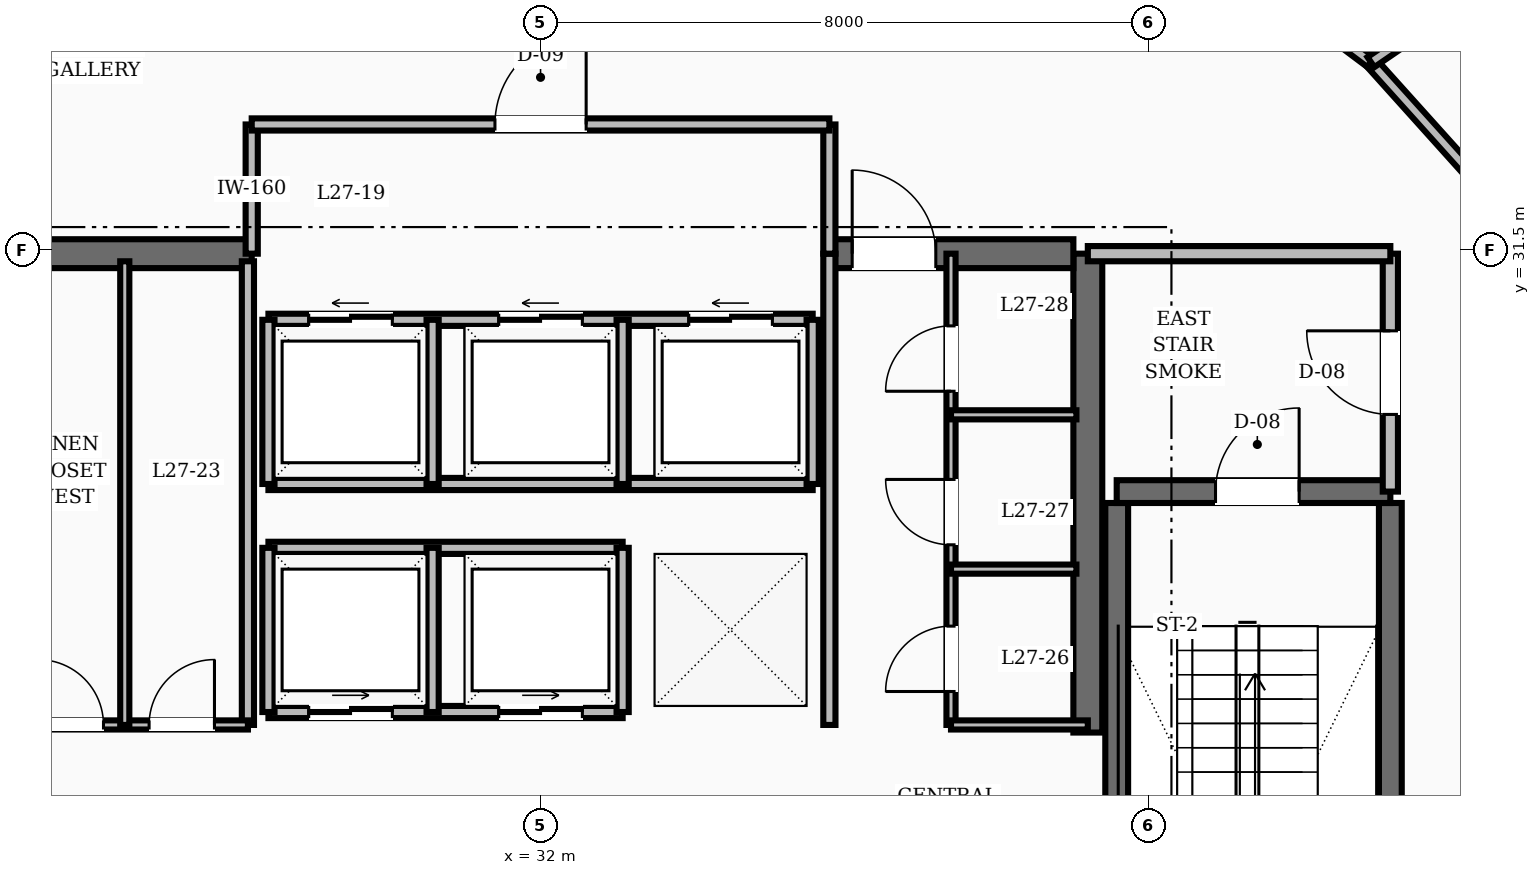
"""IFC4 building model, lengths in metres.
Left out: names, types, materials, properties, quantities, classifications, styles, units other than length and angle.
Written with IfcOpenShell. Run it as: python <this file> out.ifc"""

import sys

from ifc_helpers import new_model, si_unit, direction, frame, frame_2d, origin, place, context, subcontext, project, spatial, rectangle, extrude, element, fill, save


model = new_model("IFC4")
c1 = context("Model", 3, precision=1e-05, world=origin(), true_north=direction((0.0, 1.0)))
c2 = subcontext(c1, "Body", "Model", "MODEL_VIEW")
j1 = project(units=[si_unit("LENGTHUNIT", "METRE"), si_unit("PLANEANGLEUNIT", "RADIAN")], contexts=[c1])
p1 = place(None, origin())
s1 = spatial("IfcSite", under=j1, at=p1, CompositionType="ELEMENT")
p2 = place(p1, origin())
s2 = spatial("IfcBuilding", under=s1, at=p2, CompositionType="ELEMENT")
p3 = place(p2, frame((0.0, 0.0, 106.0)))
s3 = spatial("IfcBuildingStorey", under=s2, at=p3, CompositionType="ELEMENT", Elevation=106.0)
p4 = place(p3, frame((39.2, 25.15, 0.0), z_axis=(0.0, 0.0, 1.0), x_axis=(0.0, 1.0, 0.0)))
e1 = element("IfcWall", 1, at=p4, inside=s3, PredefinedType="SHEAR", context=c2, shape_type="SweptSolid", body=[
    extrude(rectangle(XDim=6.3, YDim=0.38, at=frame_2d((3.15, 0.0))), origin(), (0.0, 0.0, 1.0), 4.8),
])
p5 = place(p3, frame((24.99, 31.45, 0.0), z_axis=(0.0, 0.0, 1.0), x_axis=(1.0, 0.0, 0.0)))
e2 = element("IfcWall", 2, at=p5, inside=s3, PredefinedType="SHEAR", context=c2, shape_type="SweptSolid", body=[
    extrude(rectangle(XDim=3.21, YDim=0.38, at=frame_2d((1.605, 0.0))), origin(), (0.0, 0.0, 1.0), 4.8),
])
p6 = place(p3, frame((35.8, 31.45, 0.0), z_axis=(0.0, 0.0, 1.0), x_axis=(1.0, 0.0, 0.0)))
e3 = element("IfcWall", 3, at=p6, inside=s3, PredefinedType="SHEAR", context=c2, shape_type="SweptSolid", body=[
    extrude(rectangle(XDim=3.21, YDim=0.38, at=frame_2d((1.605, 0.0))), origin(), (0.0, 0.0, 1.0), 4.8),
])
p7 = place(p6, frame((0.3, 0.0, 0.0)))
e4 = element("IfcOpeningElement", 4, at=p7, cuts=e3, PredefinedType="OPENING", context=c2, shape_type="SweptSolid", body=[
    extrude(rectangle(XDim=1.1, YDim=2.1, at=frame_2d((0.55, 1.05))), frame((0.0, 0.2, 0.0), z_axis=(0.0, -1.0, 0.0), x_axis=(1.0, 0.0, 0.0)), (0.0, 0.0, 1.0), 0.4),
])
for number, where, z_axis, x_axis in (
    (5, (43.18, 19.43, 0.0), (0.0, 0.0, 1.0), (0.0, 1.0, 0.0)),
    (6, (39.58, 19.43, 0.0), (0.0, 0.0, 1.0), (0.0, 1.0, 0.0)),
):
    element("IfcWall", number, at=place(p3, frame(where, z_axis=z_axis, x_axis=x_axis)), inside=s3, PredefinedType="SHEAR", context=c2, shape_type="SweptSolid", body=[
        extrude(rectangle(XDim=8.74, YDim=0.3, at=frame_2d((4.37, 0.0))), origin(), (0.0, 0.0, 1.0), 4.8),
    ])
p8 = place(p3, frame((39.58, 28.32, 0.0), z_axis=(0.0, 0.0, 1.0), x_axis=(1.0, 0.0, 0.0)))
e7 = element("IfcWall", 7, at=p8, inside=s3, PredefinedType="SHEAR", context=c2, shape_type="SweptSolid", body=[
    extrude(rectangle(XDim=3.6, YDim=0.3, at=frame_2d((1.8, 0.0))), origin(), (0.0, 0.0, 1.0), 4.8),
])
p9 = place(p8, frame((1.3, 0.0, 0.0)))
e8 = element("IfcOpeningElement", 8, at=p9, cuts=e7, PredefinedType="OPENING", context=c2, shape_type="SweptSolid", body=[
    extrude(rectangle(XDim=1.1, YDim=2.1, at=frame_2d((0.55, 1.05))), frame((0.0, 0.16, 0.0), z_axis=(0.0, -1.0, 0.0), x_axis=(1.0, 0.0, 0.0)), (0.0, 0.0, 1.0), 0.32),
])
p10 = place(p3, frame((43.18, 28.32, 0.0), z_axis=(0.0, 0.0, 1.0), x_axis=(0.0, 1.0, 0.0)))
e9 = element("IfcWall", 9, at=p10, inside=s3, PredefinedType="SOLIDWALL", context=c2, shape_type="SweptSolid", body=[
    extrude(rectangle(XDim=3.13, YDim=0.2, at=frame_2d((1.565, 0.0))), origin(), (0.0, 0.0, 1.0), 3.71),
])
p11 = place(p10, frame((1.015, 0.0, 0.0)))
e10 = element("IfcOpeningElement", 10, at=p11, cuts=e9, PredefinedType="OPENING", context=c2, shape_type="SweptSolid", body=[
    extrude(rectangle(XDim=1.1, YDim=2.1, at=frame_2d((0.55, 1.05))), frame((0.0, 0.11, 0.0), z_axis=(0.0, -1.0, 0.0), x_axis=(1.0, 0.0, 0.0)), (0.0, 0.0, 1.0), 0.22),
])
p12 = place(p3, frame((39.2, 31.45, 0.0), z_axis=(0.0, 0.0, 1.0), x_axis=(1.0, 0.0, 0.0)))
e11 = element("IfcWall", 11, at=p12, inside=s3, PredefinedType="SOLIDWALL", context=c2, shape_type="SweptSolid", body=[
    extrude(rectangle(XDim=3.98, YDim=0.2, at=frame_2d((1.99, 0.0))), origin(), (0.0, 0.0, 1.0), 3.71),
])
p13 = place(p3, frame((35.8, 25.25, 0.0), z_axis=(0.0, 0.0, 1.0), x_axis=(0.0, 1.0, 0.0)))
e12 = element("IfcWall", 12, at=p13, inside=s3, PredefinedType="SOLIDWALL", context=c2, shape_type="SweptSolid", body=[
    extrude(rectangle(XDim=6.2, YDim=0.16, at=frame_2d((3.1, 0.0))), origin(), (0.0, 0.0, 1.0), 3.71),
])
p14 = place(p3, frame((28.42, 30.58, 0.0), z_axis=(0.0, 0.0, 1.0), x_axis=(1.0, 0.0, 0.0)))
e13 = element("IfcWall", 13, at=p14, inside=s3, PredefinedType="SOLIDWALL", context=c2, shape_type="SweptSolid", body=[
    extrude(rectangle(XDim=7.16, YDim=0.16, at=frame_2d((3.58, 0.0))), origin(), (0.0, 0.0, 1.0), 3.71),
])
p15 = place(p14, frame((0.53, 0.0, 0.0)))
e14 = element("IfcOpeningElement", 14, at=p15, cuts=e13, PredefinedType="OPENING", context=c2, shape_type="SweptSolid", body=[
    extrude(rectangle(XDim=1.1, YDim=2.15, at=frame_2d((0.55, 1.075))), frame((0.0, 0.09, 0.0), z_axis=(0.0, -1.0, 0.0), x_axis=(1.0, 0.0, 0.0)), (0.0, 0.0, 1.0), 0.18),
])
p16 = place(p14, frame((3.03, 0.0, 0.0)))
e15 = element("IfcOpeningElement", 15, at=p16, cuts=e13, PredefinedType="OPENING", context=c2, shape_type="SweptSolid", body=[
    extrude(rectangle(XDim=1.1, YDim=2.15, at=frame_2d((0.55, 1.075))), frame((0.0, 0.09, 0.0), z_axis=(0.0, -1.0, 0.0), x_axis=(1.0, 0.0, 0.0)), (0.0, 0.0, 1.0), 0.18),
])
p17 = place(p14, frame((5.53, 0.0, 0.0)))
e16 = element("IfcOpeningElement", 16, at=p17, cuts=e13, PredefinedType="OPENING", context=c2, shape_type="SweptSolid", body=[
    extrude(rectangle(XDim=1.1, YDim=2.15, at=frame_2d((0.55, 1.075))), frame((0.0, 0.09, 0.0), z_axis=(0.0, -1.0, 0.0), x_axis=(1.0, 0.0, 0.0)), (0.0, 0.0, 1.0), 0.18),
])
p18 = place(p3, frame((28.42, 28.42, 0.0), z_axis=(0.0, 0.0, 1.0), x_axis=(1.0, 0.0, 0.0)))
e17 = element("IfcWall", 17, at=p18, inside=s3, PredefinedType="SOLIDWALL", context=c2, shape_type="SweptSolid", body=[
    extrude(rectangle(XDim=7.16, YDim=0.16, at=frame_2d((3.58, 0.0))), origin(), (0.0, 0.0, 1.0), 3.71),
])
for number, where, z_axis, x_axis in (
    (18, (28.42, 28.42, 0.0), (0.0, 0.0, 1.0), (0.0, 1.0, 0.0)),
    (19, (30.58, 28.42, 0.0), (0.0, 0.0, 1.0), (0.0, 1.0, 0.0)),
    (20, (33.08, 28.42, 0.0), (0.0, 0.0, 1.0), (0.0, 1.0, 0.0)),
    (21, (35.58, 28.42, 0.0), (0.0, 0.0, 1.0), (0.0, 1.0, 0.0)),
):
    element("IfcWall", number, at=place(p3, frame(where, z_axis=z_axis, x_axis=x_axis)), inside=s3, PredefinedType="SOLIDWALL", context=c2, shape_type="SweptSolid", body=[
        extrude(rectangle(XDim=2.16, YDim=0.16, at=frame_2d((1.08, 0.0))), origin(), (0.0, 0.0, 1.0), 3.71),
    ])
p19 = place(p3, frame((28.42, 25.42, 0.0), z_axis=(0.0, 0.0, 1.0), x_axis=(1.0, 0.0, 0.0)))
e22 = element("IfcWall", 22, at=p19, inside=s3, PredefinedType="SOLIDWALL", context=c2, shape_type="SweptSolid", body=[
    extrude(rectangle(XDim=4.66, YDim=0.16, at=frame_2d((2.33, 0.0))), origin(), (0.0, 0.0, 1.0), 3.71),
])
p20 = place(p19, frame((0.53, 0.0, 0.0)))
e23 = element("IfcOpeningElement", 23, at=p20, cuts=e22, PredefinedType="OPENING", context=c2, shape_type="SweptSolid", body=[
    extrude(rectangle(XDim=1.1, YDim=2.15, at=frame_2d((0.55, 1.075))), frame((0.0, 0.09, 0.0), z_axis=(0.0, -1.0, 0.0), x_axis=(1.0, 0.0, 0.0)), (0.0, 0.0, 1.0), 0.18),
])
p21 = place(p19, frame((3.03, 0.0, 0.0)))
e24 = element("IfcOpeningElement", 24, at=p21, cuts=e22, PredefinedType="OPENING", context=c2, shape_type="SweptSolid", body=[
    extrude(rectangle(XDim=1.1, YDim=2.15, at=frame_2d((0.55, 1.075))), frame((0.0, 0.09, 0.0), z_axis=(0.0, -1.0, 0.0), x_axis=(1.0, 0.0, 0.0)), (0.0, 0.0, 1.0), 0.18),
])
p22 = place(p3, frame((28.42, 27.58, 0.0), z_axis=(0.0, 0.0, 1.0), x_axis=(1.0, 0.0, 0.0)))
e25 = element("IfcWall", 25, at=p22, inside=s3, PredefinedType="SOLIDWALL", context=c2, shape_type="SweptSolid", body=[
    extrude(rectangle(XDim=4.66, YDim=0.16, at=frame_2d((2.33, 0.0))), origin(), (0.0, 0.0, 1.0), 3.71),
])
for number, where, z_axis, x_axis in (
    (26, (28.42, 25.42, 0.0), (0.0, 0.0, 1.0), (0.0, 1.0, 0.0)),
    (27, (30.58, 25.42, 0.0), (0.0, 0.0, 1.0), (0.0, 1.0, 0.0)),
    (28, (33.08, 25.42, 0.0), (0.0, 0.0, 1.0), (0.0, 1.0, 0.0)),
):
    element("IfcWall", number, at=place(p3, frame(where, z_axis=z_axis, x_axis=x_axis)), inside=s3, PredefinedType="SOLIDWALL", context=c2, shape_type="SweptSolid", body=[
        extrude(rectangle(XDim=2.16, YDim=0.16, at=frame_2d((1.08, 0.0))), origin(), (0.0, 0.0, 1.0), 3.71),
    ])
for number, where, z_axis, x_axis in (
    (29, (28.2, 31.45, 0.0), (0.0, 0.0, 1.0), (0.0, 1.0, 0.0)),
    (30, (35.8, 31.45, 0.0), (0.0, 0.0, 1.0), (0.0, 1.0, 0.0)),
):
    element("IfcWall", number, at=place(p3, frame(where, z_axis=z_axis, x_axis=x_axis)), inside=s3, PredefinedType="SOLIDWALL", context=c2, shape_type="SweptSolid", body=[
        extrude(rectangle(XDim=1.7, YDim=0.16, at=frame_2d((0.85, 0.0))), origin(), (0.0, 0.0, 1.0), 3.71),
    ])
p23 = place(p3, frame((28.2, 33.15, 0.0), z_axis=(0.0, 0.0, 1.0), x_axis=(1.0, 0.0, 0.0)))
e31 = element("IfcWall", 31, at=p23, inside=s3, PredefinedType="SOLIDWALL", context=c2, shape_type="SweptSolid", body=[
    extrude(rectangle(XDim=7.6, YDim=0.16, at=frame_2d((3.8, 0.0))), origin(), (0.0, 0.0, 1.0), 3.71),
])
p24 = place(p23, frame((3.2, 0.0, 0.0)))
e32 = element("IfcOpeningElement", 32, at=p24, cuts=e31, PredefinedType="OPENING", context=c2, shape_type="SweptSolid", body=[
    extrude(rectangle(XDim=1.2, YDim=2.1, at=frame_2d((0.6, 1.05))), frame((0.0, 0.09, 0.0), z_axis=(0.0, -1.0, 0.0), x_axis=(1.0, 0.0, 0.0)), (0.0, 0.0, 1.0), 0.18),
])
p25 = place(p3, frame((28.15, 25.25, 0.0), z_axis=(0.0, 0.0, 1.0), x_axis=(0.0, 1.0, 0.0)))
e33 = element("IfcWall", 33, at=p25, inside=s3, PredefinedType="SOLIDWALL", context=c2, shape_type="SweptSolid", body=[
    extrude(rectangle(XDim=6.1, YDim=0.16, at=frame_2d((3.05, 0.0))), origin(), (0.0, 0.0, 1.0), 3.71),
])
p26 = place(p3, frame((24.95, 25.25, 0.0), z_axis=(0.0, 0.0, 1.0), x_axis=(1.0, 0.0, 0.0)))
e34 = element("IfcWall", 34, at=p26, inside=s3, PredefinedType="PARTITIONING", context=c2, shape_type="SweptSolid", body=[
    extrude(rectangle(XDim=3.2, YDim=0.12, at=frame_2d((1.6, 0.0))), origin(), (0.0, 0.0, 1.0), 3.71),
])
p27 = place(p26, frame((0.44, 0.0, 0.0)))
e35 = element("IfcOpeningElement", 35, at=p27, cuts=e34, PredefinedType="OPENING", context=c2, shape_type="SweptSolid", body=[
    extrude(rectangle(XDim=0.86, YDim=2.1, at=frame_2d((0.43, 1.05))), frame((0.0, 0.07, 0.0), z_axis=(0.0, -1.0, 0.0), x_axis=(1.0, 0.0, 0.0)), (0.0, 0.0, 1.0), 0.14),
])
p28 = place(p26, frame((1.9, 0.0, 0.0)))
e36 = element("IfcOpeningElement", 36, at=p28, cuts=e34, PredefinedType="OPENING", context=c2, shape_type="SweptSolid", body=[
    extrude(rectangle(XDim=0.86, YDim=2.1, at=frame_2d((0.43, 1.05))), frame((0.0, 0.07, 0.0), z_axis=(0.0, -1.0, 0.0), x_axis=(1.0, 0.0, 0.0)), (0.0, 0.0, 1.0), 0.14),
])
p29 = place(p3, frame((37.4, 25.25, 0.0), z_axis=(0.0, 0.0, 1.0), x_axis=(0.0, 1.0, 0.0)))
e37 = element("IfcWall", 37, at=p29, inside=s3, PredefinedType="PARTITIONING", context=c2, shape_type="SweptSolid", body=[
    extrude(rectangle(XDim=6.2, YDim=0.12, at=frame_2d((3.1, 0.0))), origin(), (0.0, 0.0, 1.0), 3.71),
])
p30 = place(p29, frame((0.44, 0.0, 0.0)))
e38 = element("IfcOpeningElement", 38, at=p30, cuts=e37, PredefinedType="OPENING", context=c2, shape_type="SweptSolid", body=[
    extrude(rectangle(XDim=0.86, YDim=2.1, at=frame_2d((0.43, 1.05))), frame((0.0, 0.07, 0.0), z_axis=(0.0, -1.0, 0.0), x_axis=(1.0, 0.0, 0.0)), (0.0, 0.0, 1.0), 0.14),
])
p31 = place(p29, frame((2.37, 0.0, 0.0)))
e39 = element("IfcOpeningElement", 39, at=p31, cuts=e37, PredefinedType="OPENING", context=c2, shape_type="SweptSolid", body=[
    extrude(rectangle(XDim=0.86, YDim=2.1, at=frame_2d((0.43, 1.05))), frame((0.0, 0.07, 0.0), z_axis=(0.0, -1.0, 0.0), x_axis=(1.0, 0.0, 0.0)), (0.0, 0.0, 1.0), 0.14),
])
p32 = place(p29, frame((4.39, 0.0, 0.0)))
e40 = element("IfcOpeningElement", 40, at=p32, cuts=e37, PredefinedType="OPENING", context=c2, shape_type="SweptSolid", body=[
    extrude(rectangle(XDim=0.86, YDim=2.1, at=frame_2d((0.43, 1.05))), frame((0.0, 0.07, 0.0), z_axis=(0.0, -1.0, 0.0), x_axis=(1.0, 0.0, 0.0)), (0.0, 0.0, 1.0), 0.14),
])
p33 = place(p3, frame((37.4, 25.25, 0.0), z_axis=(0.0, 0.0, 1.0), x_axis=(1.0, 0.0, 0.0)))
e41 = element("IfcWall", 41, at=p33, inside=s3, PredefinedType="PARTITIONING", context=c2, shape_type="SweptSolid", body=[
    extrude(rectangle(XDim=1.8, YDim=0.12, at=frame_2d((0.9, 0.0))), origin(), (0.0, 0.0, 1.0), 3.71),
])
p34 = place(p3, frame((26.53, 25.25, 0.0), z_axis=(0.0, 0.0, 1.0), x_axis=(0.0, 1.0, 0.0)))
e42 = element("IfcWall", 42, at=p34, inside=s3, PredefinedType="PARTITIONING", context=c2, shape_type="SweptSolid", body=[
    extrude(rectangle(XDim=6.1, YDim=0.12, at=frame_2d((3.05, 0.0))), origin(), (0.0, 0.0, 1.0), 3.71),
])
for number, where, z_axis, x_axis in (
    (43, (37.4, 27.3, 0.0), (0.0, 0.0, 1.0), (1.0, 0.0, 0.0)),
    (44, (37.4, 29.33, 0.0), (0.0, 0.0, 1.0), (1.0, 0.0, 0.0)),
):
    element("IfcWall", number, at=place(p3, frame(where, z_axis=z_axis, x_axis=x_axis)), inside=s3, PredefinedType="PARTITIONING", context=c2, shape_type="SweptSolid", body=[
        extrude(rectangle(XDim=1.65, YDim=0.12, at=frame_2d((0.825, 0.0))), origin(), (0.0, 0.0, 1.0), 3.71),
    ])
p35 = place(p3, frame((44.846, 31.833, 0.0), z_axis=(0.0, 0.0, 1.0), x_axis=(-0.668645478294, 0.743581350194, 0.0)))
e45 = element("IfcWall", 45, at=p35, inside=s3, PredefinedType="SOLIDWALL", context=c2, shape_type="SweptSolid", body=[
    extrude(rectangle(XDim=2.874, YDim=0.16, at=frame_2d((1.437, 0.0))), origin(), (0.0, 0.0, 1.0), 3.71),
])
p36 = place(p3, frame((42.925, 33.97, 0.0), z_axis=(0.0, 0.0, 1.0), x_axis=(-0.800420462314, 0.599438973966, 0.0)))
e46 = element("IfcWall", 46, at=p36, inside=s3, PredefinedType="SOLIDWALL", context=c2, shape_type="SweptSolid", body=[
    extrude(rectangle(XDim=2.925, YDim=0.16, at=frame_2d((1.462, 0.0))), origin(), (0.0, 0.0, 1.0), 3.71),
])
p37 = place(p3, frame((42.925, 33.97, 0.0), z_axis=(0.0, 0.0, 1.0), x_axis=(0.825084174335, 0.56500982758, 0.0)))
e47 = element("IfcWall", 47, at=p37, inside=s3, PredefinedType="SOLIDWALL", context=c2, shape_type="SweptSolid", body=[
    extrude(rectangle(XDim=9.747, YDim=0.16, at=frame_2d((4.874, 0.0))), origin(), (0.0, 0.0, 1.0), 3.71),
])
p38 = place(p9, origin())
e48 = element("IfcDoor", 48, at=p38, inside=s3, OperationType="SINGLE_SWING_RIGHT", PredefinedType="DOOR", context=c2, shape_type="SweptSolid", body=[
    extrude(rectangle(XDim=1.1, YDim=2.1, at=frame_2d((0.55, 1.05))), frame((0.0, 0.025, 0.0), z_axis=(0.0, -1.0, 0.0), x_axis=(1.0, 0.0, 0.0)), (0.0, 0.0, 1.0), 0.05),
])
fill(e8, e48)
p39 = place(p11, origin())
e49 = element("IfcDoor", 49, at=p39, inside=s3, OperationType="SINGLE_SWING_RIGHT", PredefinedType="DOOR", context=c2, shape_type="SweptSolid", body=[
    extrude(rectangle(XDim=1.1, YDim=2.1, at=frame_2d((0.55, 1.05))), frame((0.0, 0.025, 0.0), z_axis=(0.0, -1.0, 0.0), x_axis=(1.0, 0.0, 0.0)), (0.0, 0.0, 1.0), 0.05),
])
fill(e10, e49)
p40 = place(p7, origin())
e50 = element("IfcDoor", 50, at=p40, inside=s3, OperationType="SINGLE_SWING_LEFT", PredefinedType="DOOR", context=c2, shape_type="SweptSolid", body=[
    extrude(rectangle(XDim=1.1, YDim=2.1, at=frame_2d((0.55, 1.05))), frame((0.0, 0.025, 0.0), z_axis=(0.0, -1.0, 0.0), x_axis=(1.0, 0.0, 0.0)), (0.0, 0.0, 1.0), 0.05),
])
fill(e4, e50)
p41 = place(p15, origin())
e51 = element("IfcDoor", 51, at=p41, inside=s3, OperationType="SLIDING_TO_LEFT", PredefinedType="DOOR", context=c2, shape_type="SweptSolid", body=[
    extrude(rectangle(XDim=1.1, YDim=2.15, at=frame_2d((0.55, 1.075))), frame((0.0, 0.025, 0.0), z_axis=(0.0, -1.0, 0.0), x_axis=(1.0, 0.0, 0.0)), (0.0, 0.0, 1.0), 0.05),
])
fill(e14, e51)
p42 = place(p16, origin())
e52 = element("IfcDoor", 52, at=p42, inside=s3, OperationType="SLIDING_TO_LEFT", PredefinedType="DOOR", context=c2, shape_type="SweptSolid", body=[
    extrude(rectangle(XDim=1.1, YDim=2.15, at=frame_2d((0.55, 1.075))), frame((0.0, 0.025, 0.0), z_axis=(0.0, -1.0, 0.0), x_axis=(1.0, 0.0, 0.0)), (0.0, 0.0, 1.0), 0.05),
])
fill(e15, e52)
p43 = place(p17, origin())
e53 = element("IfcDoor", 53, at=p43, inside=s3, OperationType="SLIDING_TO_LEFT", PredefinedType="DOOR", context=c2, shape_type="SweptSolid", body=[
    extrude(rectangle(XDim=1.1, YDim=2.15, at=frame_2d((0.55, 1.075))), frame((0.0, 0.025, 0.0), z_axis=(0.0, -1.0, 0.0), x_axis=(1.0, 0.0, 0.0)), (0.0, 0.0, 1.0), 0.05),
])
fill(e16, e53)
p44 = place(p20, origin())
e54 = element("IfcDoor", 54, at=p44, inside=s3, OperationType="SLIDING_TO_RIGHT", PredefinedType="DOOR", context=c2, shape_type="SweptSolid", body=[
    extrude(rectangle(XDim=1.1, YDim=2.15, at=frame_2d((0.55, 1.075))), frame((0.0, 0.025, 0.0), z_axis=(0.0, -1.0, 0.0), x_axis=(1.0, 0.0, 0.0)), (0.0, 0.0, 1.0), 0.05),
])
fill(e23, e54)
p45 = place(p21, origin())
e55 = element("IfcDoor", 55, at=p45, inside=s3, OperationType="SLIDING_TO_RIGHT", PredefinedType="DOOR", context=c2, shape_type="SweptSolid", body=[
    extrude(rectangle(XDim=1.1, YDim=2.15, at=frame_2d((0.55, 1.075))), frame((0.0, 0.025, 0.0), z_axis=(0.0, -1.0, 0.0), x_axis=(1.0, 0.0, 0.0)), (0.0, 0.0, 1.0), 0.05),
])
fill(e24, e55)
p46 = place(p24, origin())
e56 = element("IfcDoor", 56, at=p46, inside=s3, OperationType="SINGLE_SWING_RIGHT", PredefinedType="DOOR", context=c2, shape_type="SweptSolid", body=[
    extrude(rectangle(XDim=1.2, YDim=2.1, at=frame_2d((0.6, 1.05))), frame((0.0, 0.025, 0.0), z_axis=(0.0, -1.0, 0.0), x_axis=(1.0, 0.0, 0.0)), (0.0, 0.0, 1.0), 0.05),
])
fill(e32, e56)
p47 = place(p27, origin())
e57 = element("IfcDoor", 57, at=p47, inside=s3, OperationType="SINGLE_SWING_LEFT", PredefinedType="DOOR", context=c2, shape_type="SweptSolid", body=[
    extrude(rectangle(XDim=0.86, YDim=2.1, at=frame_2d((0.43, 1.05))), frame((0.0, 0.025, 0.0), z_axis=(0.0, -1.0, 0.0), x_axis=(1.0, 0.0, 0.0)), (0.0, 0.0, 1.0), 0.05),
])
fill(e35, e57)
p48 = place(p28, origin())
e58 = element("IfcDoor", 58, at=p48, inside=s3, OperationType="SINGLE_SWING_RIGHT", PredefinedType="DOOR", context=c2, shape_type="SweptSolid", body=[
    extrude(rectangle(XDim=0.86, YDim=2.1, at=frame_2d((0.43, 1.05))), frame((0.0, 0.025, 0.0), z_axis=(0.0, -1.0, 0.0), x_axis=(1.0, 0.0, 0.0)), (0.0, 0.0, 1.0), 0.05),
])
fill(e36, e58)
p49 = place(p30, origin())
e59 = element("IfcDoor", 59, at=p49, inside=s3, OperationType="SINGLE_SWING_LEFT", PredefinedType="DOOR", context=c2, shape_type="SweptSolid", body=[
    extrude(rectangle(XDim=0.86, YDim=2.1, at=frame_2d((0.43, 1.05))), frame((0.0, 0.025, 0.0), z_axis=(0.0, -1.0, 0.0), x_axis=(1.0, 0.0, 0.0)), (0.0, 0.0, 1.0), 0.05),
])
fill(e38, e59)
p50 = place(p31, origin())
e60 = element("IfcDoor", 60, at=p50, inside=s3, OperationType="SINGLE_SWING_RIGHT", PredefinedType="DOOR", context=c2, shape_type="SweptSolid", body=[
    extrude(rectangle(XDim=0.86, YDim=2.1, at=frame_2d((0.43, 1.05))), frame((0.0, 0.025, 0.0), z_axis=(0.0, -1.0, 0.0), x_axis=(1.0, 0.0, 0.0)), (0.0, 0.0, 1.0), 0.05),
])
fill(e39, e60)
p51 = place(p32, origin())
e61 = element("IfcDoor", 61, at=p51, inside=s3, OperationType="SINGLE_SWING_LEFT", PredefinedType="DOOR", context=c2, shape_type="SweptSolid", body=[
    extrude(rectangle(XDim=0.86, YDim=2.1, at=frame_2d((0.43, 1.05))), frame((0.0, 0.025, 0.0), z_axis=(0.0, -1.0, 0.0), x_axis=(1.0, 0.0, 0.0)), (0.0, 0.0, 1.0), 0.05),
])
fill(e40, e61)
save(model, sys.argv[1])
